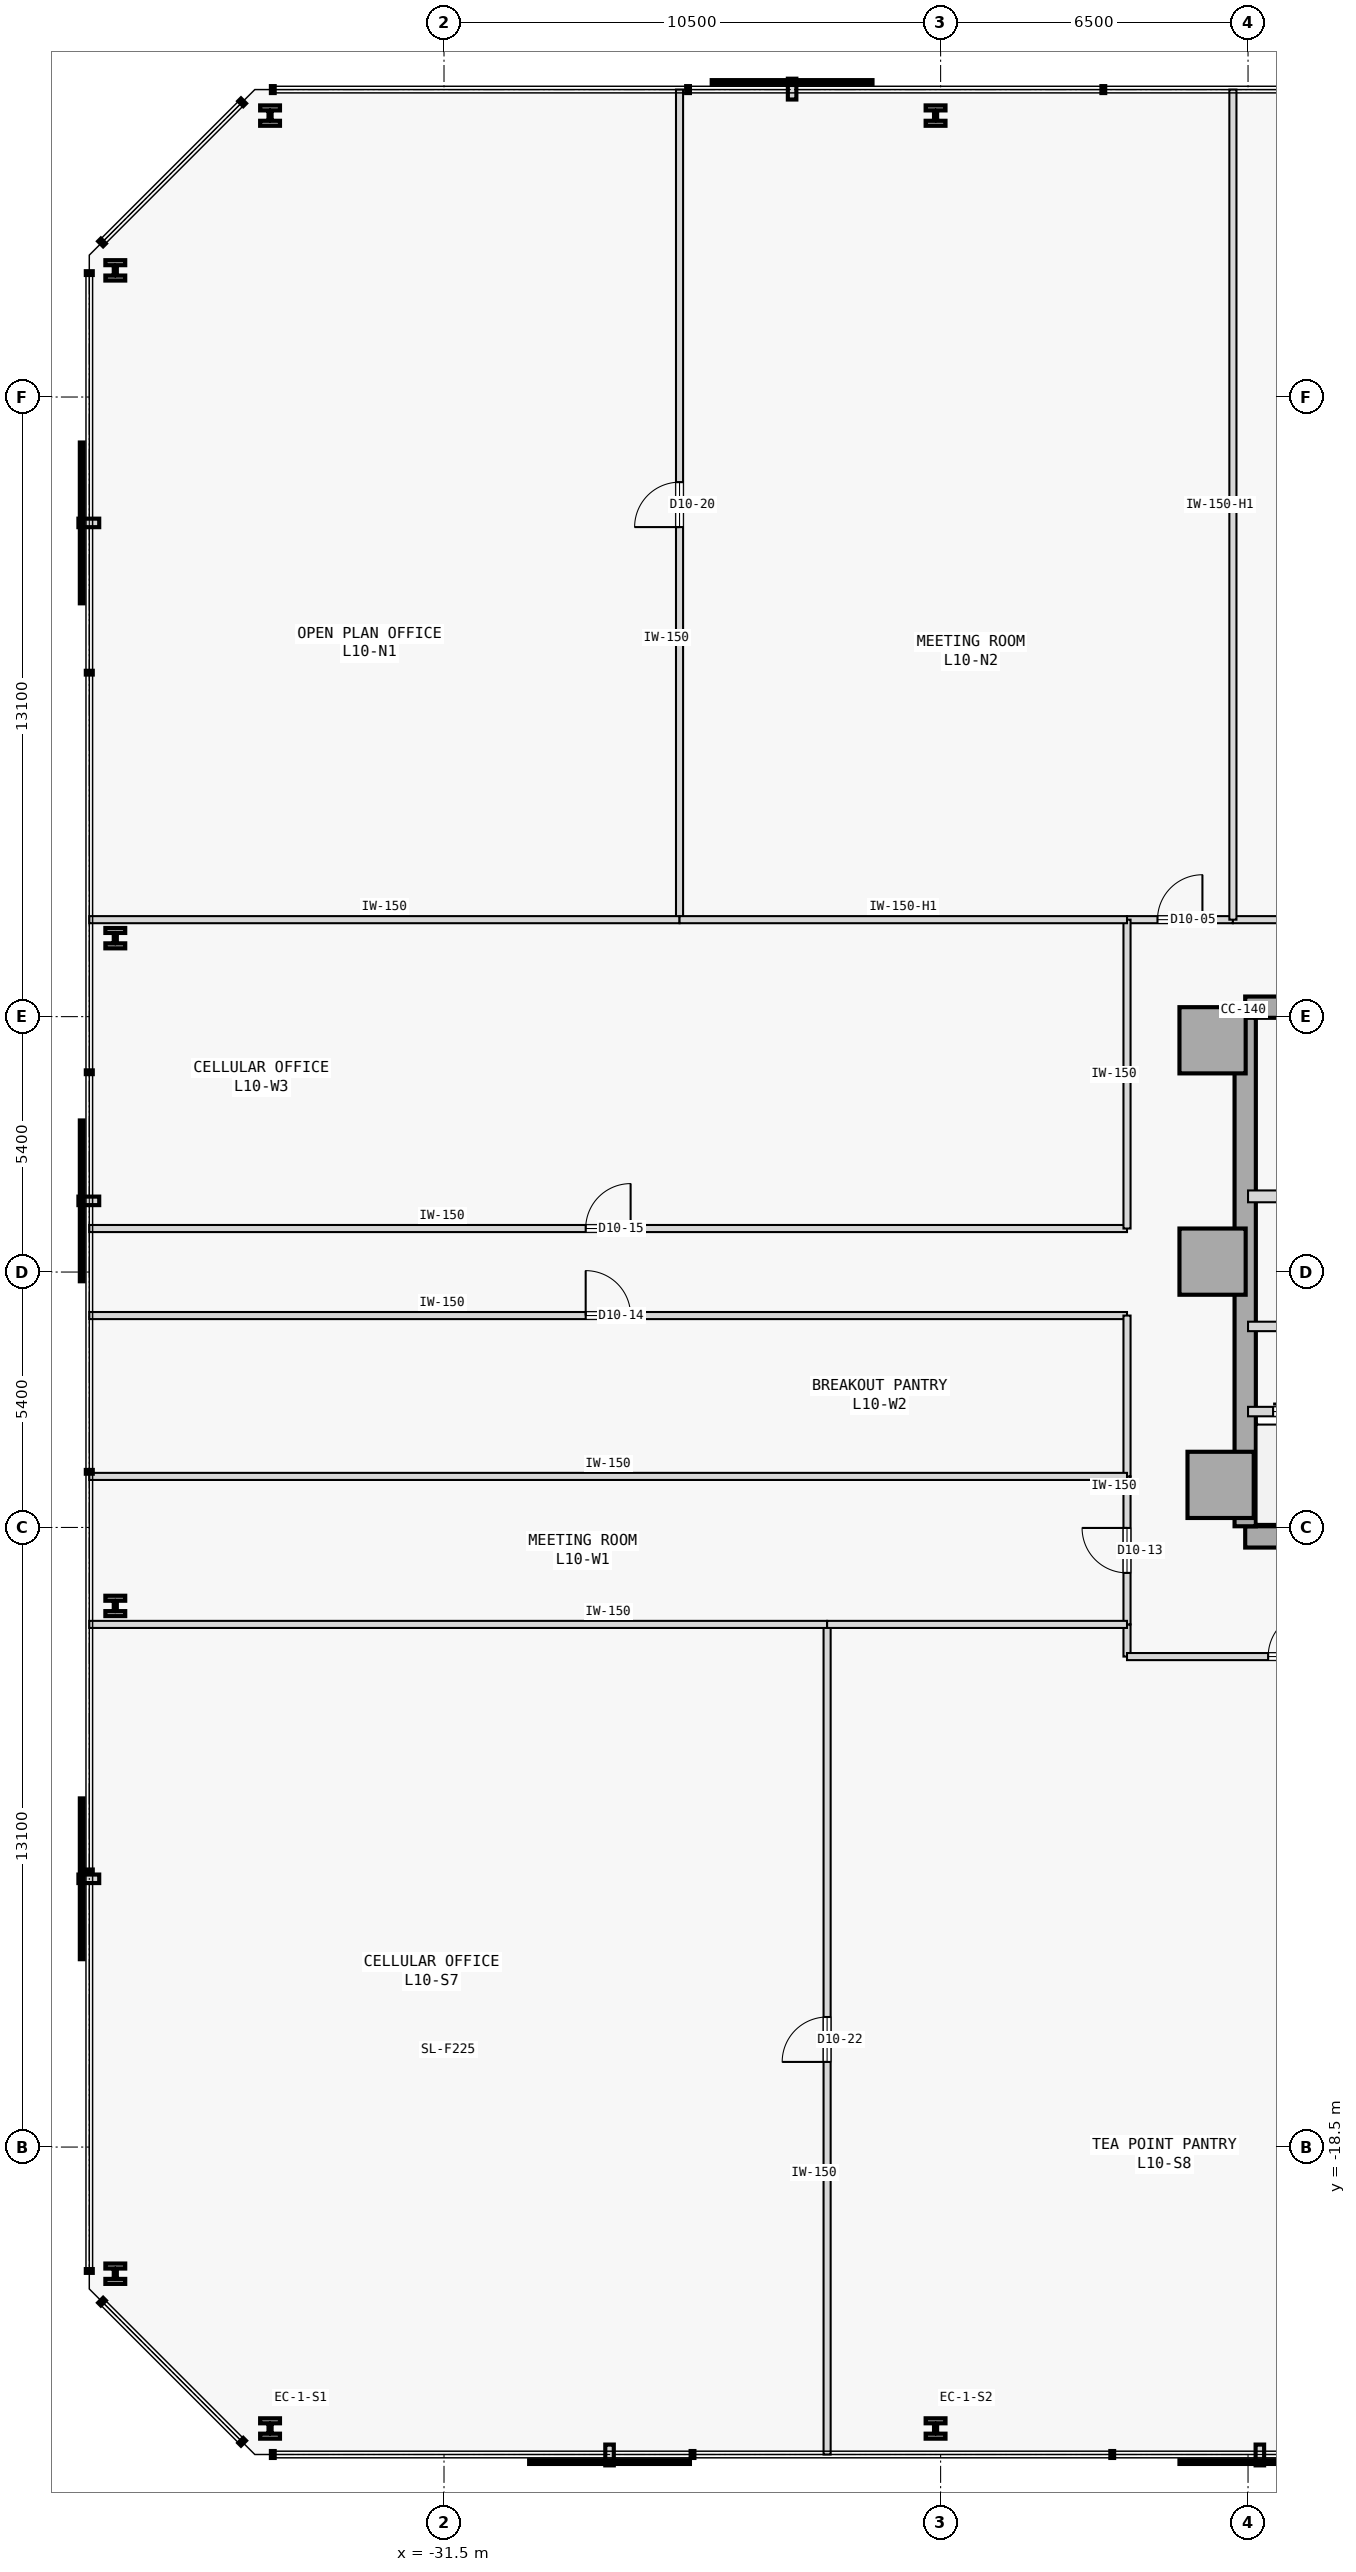
"""IFC4 building model, lengths in metres.
Left out: names, types, materials, properties, quantities, classifications, styles, units other than length and angle.
Written with IfcOpenShell. Run it as: python <this file> out.ifc"""

import sys

from ifc_helpers import new_model, si_unit, direction, frame, frame_2d, origin, origin_2d, place, context, subcontext, project, spatial, rectangle, i_section, extrude, element, fill, save


model = new_model("IFC4")
c1 = context("Model", 3, precision=1e-05, world=origin(), true_north=direction((0.0, 1.0)))
c2 = subcontext(c1, "Body", "Model", "MODEL_VIEW")
j1 = project(units=[si_unit("LENGTHUNIT", "METRE"), si_unit("PLANEANGLEUNIT", "RADIAN")], contexts=[c1])
p1 = place(None, origin())
s1 = spatial("IfcSite", under=j1, at=p1, CompositionType="ELEMENT")
p2 = place(p1, origin())
s2 = spatial("IfcBuilding", under=s1, at=p2, CompositionType="ELEMENT")
p3 = place(p2, frame((0.0, 0.0, 44.6)))
s3 = spatial("IfcBuildingStorey", under=s2, at=p3, CompositionType="ELEMENT", Elevation=44.6)
for number, where, z_axis, x_axis in (
    (1, (-15.25, 4.9, 0.0), (0.0, 0.0, 1.0), (1.0, 0.0, 0.0)),
    (2, (-15.25, 0.22, 0.0), (0.0, 0.0, 1.0), (1.0, 0.0, 0.0)),
    (3, (-15.08, -4.5, 0.0), (0.0, 0.0, 1.0), (1.0, 0.0, 0.0)),
):
    element("IfcColumn", number, at=place(p3, frame(where, z_axis=z_axis, x_axis=x_axis)), inside=s3, PredefinedType="COLUMN", context=c2, shape_type="SweptSolid", body=[
        extrude(rectangle(XDim=1.4, YDim=1.4, at=origin_2d()), origin(), (0.0, 0.0, 1.0), 3.8),
    ])
p4 = place(p3, frame((-14.56, 5.6, 0.0), z_axis=(0.0, 0.0, 1.0), x_axis=(1.0, 0.0, 0.0)))
e4 = element("IfcWall", 4, at=p4, inside=s3, PredefinedType="SHEAR", context=c2, shape_type="SweptSolid", body=[
    extrude(rectangle(XDim=11.41, YDim=0.45, at=frame_2d((5.705, 0.0))), origin(), (0.0, 0.0, 1.0), 3.575),
])
p5 = place(p3, frame((-14.56, -5.6, 0.0), z_axis=(0.0, 0.0, 1.0), x_axis=(1.0, 0.0, 0.0)))
e5 = element("IfcWall", 5, at=p5, inside=s3, PredefinedType="SHEAR", context=c2, shape_type="SweptSolid", body=[
    extrude(rectangle(XDim=10.86, YDim=0.45, at=frame_2d((5.43, 0.0))), origin(), (0.0, 0.0, 1.0), 3.575),
])
p6 = place(p3, frame((-14.56, -5.375, 0.0), z_axis=(0.0, 0.0, 1.0), x_axis=(0.0, 1.0, 0.0)))
e6 = element("IfcWall", 6, at=p6, inside=s3, PredefinedType="SHEAR", context=c2, shape_type="SweptSolid", body=[
    extrude(rectangle(XDim=10.75, YDim=0.45, at=frame_2d((5.375, 0.0))), origin(), (0.0, 0.0, 1.0), 3.575),
])
for number, where, z_axis, x_axis in (
    (7, (-35.178, -24.45, 0.0), (0.0, 0.0, 1.0), (1.0, 0.0, 0.0)),
    (8, (-21.107, -24.45, 0.0), (0.0, 0.0, 1.0), (1.0, 0.0, 0.0)),
    (9, (-21.107, 24.45, 0.0), (0.0, 0.0, 1.0), (1.0, 0.0, 0.0)),
    (10, (-35.178, 24.45, 0.0), (0.0, 0.0, 1.0), (1.0, 0.0, 0.0)),
    (11, (-38.45, 21.178, 0.0), (0.0, 0.0, 1.0), (1.0, 0.0, 0.0)),
    (12, (-38.45, 7.059, 0.0), (0.0, 0.0, 1.0), (1.0, 0.0, 0.0)),
    (13, (-38.45, -7.059, 0.0), (0.0, 0.0, 1.0), (1.0, 0.0, 0.0)),
    (14, (-38.45, -21.178, 0.0), (0.0, 0.0, 1.0), (1.0, 0.0, 0.0)),
):
    element("IfcColumn", number, at=place(p3, frame(where, z_axis=z_axis, x_axis=x_axis)), inside=s3, PredefinedType="COLUMN", context=c2, shape_type="SweptSolid", body=[
        extrude(i_section(OverallWidth=0.42, OverallDepth=0.431, WebThickness=0.065, FlangeThickness=0.106, FilletRadius=0.015, at=origin_2d()), origin(), (0.0, 0.0, 1.0), 3.8),
    ])
p7 = place(p3, frame((-14.5, 1.6, 0.0), z_axis=(0.0, 0.0, 1.0), x_axis=(1.0, 0.0, 0.0)))
e15 = element("IfcWall", 15, at=p7, inside=s3, PredefinedType="STANDARD", context=c2, shape_type="SweptSolid", body=[
    extrude(rectangle(XDim=3.6, YDim=0.25, at=frame_2d((1.8, 0.0))), origin(), (0.0, 0.0, 1.0), 3.575),
])
p8 = place(p7, frame((0.92, 0.0, 0.0)))
e16 = element("IfcOpeningElement", 16, at=p8, cuts=e15, PredefinedType="OPENING", context=c2, shape_type="SweptSolid", body=[
    extrude(rectangle(XDim=1.05, YDim=2.15, at=frame_2d((0.525, 1.075))), frame((0.0, 0.135, 0.0), z_axis=(0.0, -1.0, 0.0), x_axis=(1.0, 0.0, 0.0)), (0.0, 0.0, 1.0), 0.27),
])
p9 = place(p3, frame((-14.5, -1.15, 0.0), z_axis=(0.0, 0.0, 1.0), x_axis=(1.0, 0.0, 0.0)))
e17 = element("IfcWall", 17, at=p9, inside=s3, PredefinedType="STANDARD", context=c2, shape_type="SweptSolid", body=[
    extrude(rectangle(XDim=2.95, YDim=0.2, at=frame_2d((1.475, 0.0))), origin(), (0.0, 0.0, 1.0), 3.575),
])
p10 = place(p9, frame((0.75, 0.0, 0.0)))
e18 = element("IfcOpeningElement", 18, at=p10, cuts=e17, PredefinedType="OPENING", context=c2, shape_type="SweptSolid", body=[
    extrude(rectangle(XDim=1.05, YDim=2.18, at=frame_2d((0.525, 1.09))), frame((0.0, 0.11, 0.0), z_axis=(0.0, -1.0, 0.0), x_axis=(1.0, 0.0, 0.0)), (0.0, 0.0, 1.0), 0.22),
])
p11 = place(p3, frame((-14.5, -2.95, 0.0), z_axis=(0.0, 0.0, 1.0), x_axis=(1.0, 0.0, 0.0)))
e19 = element("IfcWall", 19, at=p11, inside=s3, PredefinedType="STANDARD", context=c2, shape_type="SweptSolid", body=[
    extrude(rectangle(XDim=10.8, YDim=0.2, at=frame_2d((5.4, 0.0))), origin(), (0.0, 0.0, 1.0), 3.575),
])
p12 = place(p11, frame((0.53, 0.0, 0.0)))
e20 = element("IfcOpeningElement", 20, at=p12, cuts=e19, PredefinedType="OPENING", context=c2, shape_type="SweptSolid", body=[
    extrude(rectangle(XDim=1.1, YDim=2.15, at=frame_2d((0.55, 1.075))), frame((0.0, 0.11, 0.0), z_axis=(0.0, -1.0, 0.0), x_axis=(1.0, 0.0, 0.0)), (0.0, 0.0, 1.0), 0.22),
])
p13 = place(p11, frame((2.69, 0.0, 0.0)))
e21 = element("IfcOpeningElement", 21, at=p13, cuts=e19, PredefinedType="OPENING", context=c2, shape_type="SweptSolid", body=[
    extrude(rectangle(XDim=1.1, YDim=2.15, at=frame_2d((0.55, 1.075))), frame((0.0, 0.11, 0.0), z_axis=(0.0, -1.0, 0.0), x_axis=(1.0, 0.0, 0.0)), (0.0, 0.0, 1.0), 0.22),
])
p14 = place(p3, frame((-17.059, 7.45, 0.0), z_axis=(0.0, 0.0, 1.0), x_axis=(1.0, 0.0, 0.0)))
e22 = element("IfcWall", 22, at=p14, inside=s3, PredefinedType="PARTITIONING", context=c2, shape_type="SweptSolid", body=[
    extrude(rectangle(XDim=2.239, YDim=0.15, at=frame_2d((1.12, 0.0))), origin(), (0.0, 0.0, 1.0), 3.575),
])
p15 = place(p14, frame((0.645, 0.0, 0.0)))
e23 = element("IfcOpeningElement", 23, at=p15, cuts=e22, PredefinedType="OPENING", context=c2, shape_type="SweptSolid", body=[
    extrude(rectangle(XDim=0.95, YDim=2.15, at=frame_2d((0.475, 1.075))), frame((0.0, 0.085, 0.0), z_axis=(0.0, -1.0, 0.0), x_axis=(1.0, 0.0, 0.0)), (0.0, 0.0, 1.0), 0.17),
])
p16 = place(p3, frame((-14.82, 7.45, 0.0), z_axis=(0.0, 0.0, 1.0), x_axis=(1.0, 0.0, 0.0)))
e24 = element("IfcWall", 24, at=p16, inside=s3, PredefinedType="PARTITIONING", context=c2, shape_type="SweptSolid", body=[
    extrude(rectangle(XDim=13.9, YDim=0.15, at=frame_2d((6.95, 0.0))), origin(), (0.0, 0.0, 1.0), 3.575),
])
p17 = place(p3, frame((-17.059, -8.13, 0.0), z_axis=(0.0, 0.0, 1.0), x_axis=(0.0, 1.0, 0.0)))
e25 = element("IfcWall", 25, at=p17, inside=s3, PredefinedType="PARTITIONING", context=c2, shape_type="SweptSolid", body=[
    extrude(rectangle(XDim=0.68, YDim=0.15, at=frame_2d((0.34, 0.0))), origin(), (0.0, 0.0, 1.0), 3.575),
])
p18 = place(p3, frame((-17.059, -8.13, 0.0), z_axis=(0.0, 0.0, 1.0), x_axis=(1.0, 0.0, 0.0)))
e26 = element("IfcWall", 26, at=p18, inside=s3, PredefinedType="PARTITIONING", context=c2, shape_type="SweptSolid", body=[
    extrude(rectangle(XDim=6.919, YDim=0.15, at=frame_2d((3.459, 0.0))), origin(), (0.0, 0.0, 1.0), 3.575),
])
p19 = place(p18, frame((2.985, 0.0, 0.0)))
e27 = element("IfcOpeningElement", 27, at=p19, cuts=e26, PredefinedType="OPENING", context=c2, shape_type="SweptSolid", body=[
    extrude(rectangle(XDim=0.95, YDim=2.15, at=frame_2d((0.475, 1.075))), frame((0.0, 0.085, 0.0), z_axis=(0.0, -1.0, 0.0), x_axis=(1.0, 0.0, 0.0)), (0.0, 0.0, 1.0), 0.17),
])
p20 = place(p3, frame((-17.059, -7.45, 0.0), z_axis=(0.0, 0.0, 1.0), x_axis=(0.0, 1.0, 0.0)))
e28 = element("IfcWall", 28, at=p20, inside=s3, PredefinedType="PARTITIONING", context=c2, shape_type="SweptSolid", body=[
    extrude(rectangle(XDim=3.129, YDim=0.15, at=frame_2d((1.564, 0.0))), origin(), (0.0, 0.0, 1.0), 3.575),
])
p21 = place(p20, frame((1.09, 0.0, 0.0)))
e29 = element("IfcOpeningElement", 29, at=p21, cuts=e28, PredefinedType="OPENING", context=c2, shape_type="SweptSolid", body=[
    extrude(rectangle(XDim=0.95, YDim=2.15, at=frame_2d((0.475, 1.075))), frame((0.0, 0.085, 0.0), z_axis=(0.0, -1.0, 0.0), x_axis=(1.0, 0.0, 0.0)), (0.0, 0.0, 1.0), 0.17),
])
p22 = place(p3, frame((-39.0, -0.92, 0.0), z_axis=(0.0, 0.0, 1.0), x_axis=(1.0, 0.0, 0.0)))
e30 = element("IfcWall", 30, at=p22, inside=s3, PredefinedType="PARTITIONING", context=c2, shape_type="SweptSolid", body=[
    extrude(rectangle(XDim=21.941, YDim=0.15, at=frame_2d((10.97, 0.0))), origin(), (0.0, 0.0, 1.0), 3.575),
])
p23 = place(p22, frame((10.496, 0.0, 0.0)))
e31 = element("IfcOpeningElement", 31, at=p23, cuts=e30, PredefinedType="OPENING", context=c2, shape_type="SweptSolid", body=[
    extrude(rectangle(XDim=0.95, YDim=2.15, at=frame_2d((0.475, 1.075))), frame((0.0, 0.085, 0.0), z_axis=(0.0, -1.0, 0.0), x_axis=(1.0, 0.0, 0.0)), (0.0, 0.0, 1.0), 0.17),
])
p24 = place(p3, frame((-17.059, -4.321, 0.0), z_axis=(0.0, 0.0, 1.0), x_axis=(0.0, 1.0, 0.0)))
e32 = element("IfcWall", 32, at=p24, inside=s3, PredefinedType="PARTITIONING", context=c2, shape_type="SweptSolid", body=[
    extrude(rectangle(XDim=3.401, YDim=0.15, at=frame_2d((1.701, 0.0))), origin(), (0.0, 0.0, 1.0), 3.575),
])
p25 = place(p3, frame((-39.0, 0.92, 0.0), z_axis=(0.0, 0.0, 1.0), x_axis=(1.0, 0.0, 0.0)))
e33 = element("IfcWall", 33, at=p25, inside=s3, PredefinedType="PARTITIONING", context=c2, shape_type="SweptSolid", body=[
    extrude(rectangle(XDim=21.941, YDim=0.15, at=frame_2d((10.97, 0.0))), origin(), (0.0, 0.0, 1.0), 3.575),
])
p26 = place(p25, frame((10.496, 0.0, 0.0)))
e34 = element("IfcOpeningElement", 34, at=p26, cuts=e33, PredefinedType="OPENING", context=c2, shape_type="SweptSolid", body=[
    extrude(rectangle(XDim=0.95, YDim=2.15, at=frame_2d((0.475, 1.075))), frame((0.0, 0.085, 0.0), z_axis=(0.0, -1.0, 0.0), x_axis=(1.0, 0.0, 0.0)), (0.0, 0.0, 1.0), 0.17),
])
p27 = place(p3, frame((-17.059, 0.92, 0.0), z_axis=(0.0, 0.0, 1.0), x_axis=(0.0, 1.0, 0.0)))
e35 = element("IfcWall", 35, at=p27, inside=s3, PredefinedType="PARTITIONING", context=c2, shape_type="SweptSolid", body=[
    extrude(rectangle(XDim=6.53, YDim=0.15, at=frame_2d((3.265, 0.0))), origin(), (0.0, 0.0, 1.0), 3.575),
])
p28 = place(p3, frame((-26.52, 7.45, 0.0), z_axis=(0.0, 0.0, 1.0), x_axis=(0.0, 1.0, 0.0)))
e36 = element("IfcWall", 36, at=p28, inside=s3, PredefinedType="PARTITIONING", context=c2, shape_type="SweptSolid", body=[
    extrude(rectangle(XDim=17.55, YDim=0.15, at=frame_2d((8.775, 0.0))), origin(), (0.0, 0.0, 1.0), 3.575),
])
p29 = place(p28, frame((8.3, 0.0, 0.0)))
e37 = element("IfcOpeningElement", 37, at=p29, cuts=e36, PredefinedType="OPENING", context=c2, shape_type="SweptSolid", body=[
    extrude(rectangle(XDim=0.95, YDim=2.15, at=frame_2d((0.475, 1.075))), frame((0.0, 0.085, 0.0), z_axis=(0.0, -1.0, 0.0), x_axis=(1.0, 0.0, 0.0)), (0.0, 0.0, 1.0), 0.17),
])
p30 = place(p3, frame((-39.0, 7.45, 0.0), z_axis=(0.0, 0.0, 1.0), x_axis=(1.0, 0.0, 0.0)))
e38 = element("IfcWall", 38, at=p30, inside=s3, PredefinedType="PARTITIONING", context=c2, shape_type="SweptSolid", body=[
    extrude(rectangle(XDim=12.48, YDim=0.15, at=frame_2d((6.24, 0.0))), origin(), (0.0, 0.0, 1.0), 3.575),
])
p31 = place(p3, frame((-14.82, 7.45, 0.0), z_axis=(0.0, 0.0, 1.0), x_axis=(0.0, 1.0, 0.0)))
e39 = element("IfcWall", 39, at=p31, inside=s3, PredefinedType="PARTITIONING", context=c2, shape_type="SweptSolid", body=[
    extrude(rectangle(XDim=17.55, YDim=0.15, at=frame_2d((8.775, 0.0))), origin(), (0.0, 0.0, 1.0), 3.125),
])
p32 = place(p3, frame((-26.52, 7.45, 0.0), z_axis=(0.0, 0.0, 1.0), x_axis=(1.0, 0.0, 0.0)))
e40 = element("IfcWall", 40, at=p32, inside=s3, PredefinedType="PARTITIONING", context=c2, shape_type="SweptSolid", body=[
    extrude(rectangle(XDim=9.461, YDim=0.15, at=frame_2d((4.73, 0.0))), origin(), (0.0, 0.0, 1.0), 3.125),
])
p33 = place(p3, frame((-23.4, -25.0, 0.0), z_axis=(0.0, 0.0, 1.0), x_axis=(0.0, 1.0, 0.0)))
e41 = element("IfcWall", 41, at=p33, inside=s3, PredefinedType="PARTITIONING", context=c2, shape_type="SweptSolid", body=[
    extrude(rectangle(XDim=17.55, YDim=0.15, at=frame_2d((8.775, 0.0))), origin(), (0.0, 0.0, 1.0), 3.575),
])
p34 = place(p33, frame((8.3, 0.0, 0.0)))
e42 = element("IfcOpeningElement", 42, at=p34, cuts=e41, PredefinedType="OPENING", context=c2, shape_type="SweptSolid", body=[
    extrude(rectangle(XDim=0.95, YDim=2.15, at=frame_2d((0.475, 1.075))), frame((0.0, 0.085, 0.0), z_axis=(0.0, -1.0, 0.0), x_axis=(1.0, 0.0, 0.0)), (0.0, 0.0, 1.0), 0.17),
])
p35 = place(p3, frame((-39.0, -7.45, 0.0), z_axis=(0.0, 0.0, 1.0), x_axis=(1.0, 0.0, 0.0)))
e43 = element("IfcWall", 43, at=p35, inside=s3, PredefinedType="PARTITIONING", context=c2, shape_type="SweptSolid", body=[
    extrude(rectangle(XDim=15.6, YDim=0.15, at=frame_2d((7.8, 0.0))), origin(), (0.0, 0.0, 1.0), 3.575),
])
p36 = place(p3, frame((-23.4, -7.45, 0.0), z_axis=(0.0, 0.0, 1.0), x_axis=(1.0, 0.0, 0.0)))
e44 = element("IfcWall", 44, at=p36, inside=s3, PredefinedType="PARTITIONING", context=c2, shape_type="SweptSolid", body=[
    extrude(rectangle(XDim=6.341, YDim=0.15, at=frame_2d((3.17, 0.0))), origin(), (0.0, 0.0, 1.0), 3.575),
])
p37 = place(p3, frame((-39.0, -4.321, 0.0), z_axis=(0.0, 0.0, 1.0), x_axis=(1.0, 0.0, 0.0)))
e45 = element("IfcWall", 45, at=p37, inside=s3, PredefinedType="PARTITIONING", context=c2, shape_type="SweptSolid", body=[
    extrude(rectangle(XDim=21.941, YDim=0.15, at=frame_2d((10.97, 0.0))), origin(), (0.0, 0.0, 1.0), 3.575),
])
p38 = place(p12, origin())
e46 = element("IfcDoor", 46, at=p38, inside=s3, OperationType="SLIDING_TO_RIGHT", PredefinedType="DOOR", context=c2, shape_type="SweptSolid", body=[
    extrude(rectangle(XDim=1.1, YDim=2.15, at=frame_2d((0.55, 1.075))), frame((0.0, 0.025, 0.0), z_axis=(0.0, -1.0, 0.0), x_axis=(1.0, 0.0, 0.0)), (0.0, 0.0, 1.0), 0.05),
])
fill(e20, e46)
p39 = place(p15, origin())
e47 = element("IfcDoor", 47, at=p39, inside=s3, OperationType="SINGLE_SWING_RIGHT", PredefinedType="DOOR", context=c2, shape_type="SweptSolid", body=[
    extrude(rectangle(XDim=0.95, YDim=2.15, at=frame_2d((0.475, 1.075))), frame((0.0, 0.025, 0.0), z_axis=(0.0, -1.0, 0.0), x_axis=(1.0, 0.0, 0.0)), (0.0, 0.0, 1.0), 0.05),
])
fill(e23, e47)
p40 = place(p19, origin())
e48 = element("IfcDoor", 48, at=p40, inside=s3, OperationType="SINGLE_SWING_RIGHT", PredefinedType="DOOR", context=c2, shape_type="SweptSolid", body=[
    extrude(rectangle(XDim=0.95, YDim=2.15, at=frame_2d((0.475, 1.075))), frame((0.0, 0.025, 0.0), z_axis=(0.0, -1.0, 0.0), x_axis=(1.0, 0.0, 0.0)), (0.0, 0.0, 1.0), 0.05),
])
fill(e27, e48)
p41 = place(p21, origin())
e49 = element("IfcDoor", 49, at=p41, inside=s3, OperationType="SINGLE_SWING_RIGHT", PredefinedType="DOOR", context=c2, shape_type="SweptSolid", body=[
    extrude(rectangle(XDim=0.95, YDim=2.15, at=frame_2d((0.475, 1.075))), frame((0.0, 0.025, 0.0), z_axis=(0.0, -1.0, 0.0), x_axis=(1.0, 0.0, 0.0)), (0.0, 0.0, 1.0), 0.05),
])
fill(e29, e49)
p42 = place(p23, origin())
e50 = element("IfcDoor", 50, at=p42, inside=s3, OperationType="SINGLE_SWING_LEFT", PredefinedType="DOOR", context=c2, shape_type="SweptSolid", body=[
    extrude(rectangle(XDim=0.95, YDim=2.15, at=frame_2d((0.475, 1.075))), frame((0.0, 0.025, 0.0), z_axis=(0.0, -1.0, 0.0), x_axis=(1.0, 0.0, 0.0)), (0.0, 0.0, 1.0), 0.05),
])
fill(e31, e50)
p43 = place(p26, origin())
e51 = element("IfcDoor", 51, at=p43, inside=s3, OperationType="SINGLE_SWING_RIGHT", PredefinedType="DOOR", context=c2, shape_type="SweptSolid", body=[
    extrude(rectangle(XDim=0.95, YDim=2.15, at=frame_2d((0.475, 1.075))), frame((0.0, 0.025, 0.0), z_axis=(0.0, -1.0, 0.0), x_axis=(1.0, 0.0, 0.0)), (0.0, 0.0, 1.0), 0.05),
])
fill(e34, e51)
p44 = place(p29, origin())
e52 = element("IfcDoor", 52, at=p44, inside=s3, OperationType="SINGLE_SWING_LEFT", PredefinedType="DOOR", context=c2, shape_type="SweptSolid", body=[
    extrude(rectangle(XDim=0.95, YDim=2.15, at=frame_2d((0.475, 1.075))), frame((0.0, 0.025, 0.0), z_axis=(0.0, -1.0, 0.0), x_axis=(1.0, 0.0, 0.0)), (0.0, 0.0, 1.0), 0.05),
])
fill(e37, e52)
p45 = place(p34, origin())
e53 = element("IfcDoor", 53, at=p45, inside=s3, OperationType="SINGLE_SWING_LEFT", PredefinedType="DOOR", context=c2, shape_type="SweptSolid", body=[
    extrude(rectangle(XDim=0.95, YDim=2.15, at=frame_2d((0.475, 1.075))), frame((0.0, 0.025, 0.0), z_axis=(0.0, -1.0, 0.0), x_axis=(1.0, 0.0, 0.0)), (0.0, 0.0, 1.0), 0.05),
])
fill(e42, e53)
save(model, sys.argv[1])
